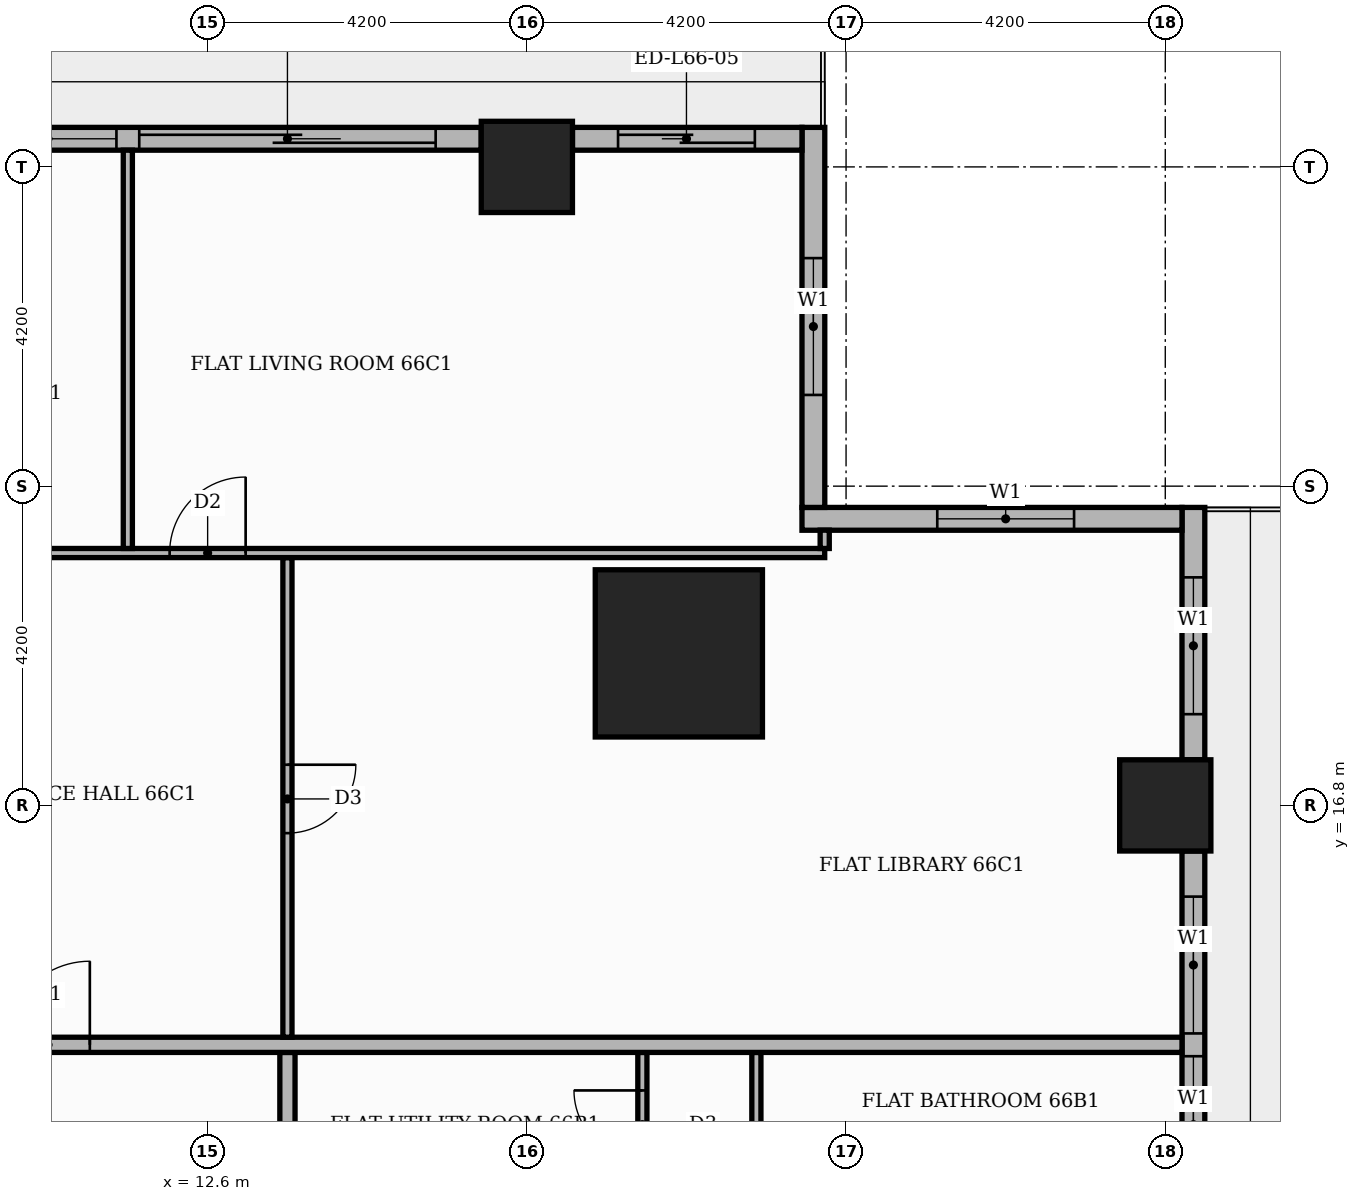
"""IFC4 building model, lengths in metres.
Left out: names, types, materials, properties, quantities, classifications, styles, units other than length and angle.
Written with IfcOpenShell. Run it as: python <this file> out.ifc"""

import sys

from ifc_helpers import new_model, si_unit, direction, frame, frame_2d, origin, origin_2d, place, context, subcontext, project, spatial, rectangle, extrude, element, fill, save


model = new_model("IFC4")
c1 = context("Model", 3, precision=1e-05, world=origin(), true_north=direction((0.0, 1.0)))
c2 = subcontext(c1, "Body", "Model", "MODEL_VIEW")
j1 = project(units=[si_unit("LENGTHUNIT", "METRE"), si_unit("PLANEANGLEUNIT", "RADIAN")], contexts=[c1])
p1 = place(None, origin())
s1 = spatial("IfcSite", under=j1, at=p1, CompositionType="ELEMENT")
p2 = place(p1, origin())
s2 = spatial("IfcBuilding", under=s1, at=p2, CompositionType="ELEMENT")
p3 = place(p2, frame((0.0, 0.0, 275.7)))
s3 = spatial("IfcBuildingStorey", under=s2, at=p3, CompositionType="ELEMENT", Elevation=275.7)
p4 = place(p3, frame((18.8, 18.8, 0.0), z_axis=(0.0, 0.0, 1.0), x_axis=(1.0, 0.0, 0.0)))
e1 = element("IfcColumn", 1, at=p4, inside=s3, PredefinedType="COLUMN", context=c2, shape_type="SweptSolid", body=[
    extrude(rectangle(XDim=2.2, YDim=2.2, at=origin_2d()), origin(), (0.0, 0.0, 1.0), 3.9),
])
for number, where, z_axis, x_axis in (
    (2, (25.2, 16.8, 0.0), (0.0, 0.0, 1.0), (1.0, 0.0, 0.0)),
    (3, (16.8, 25.2, 0.0), (0.0, 0.0, 1.0), (1.0, 0.0, 0.0)),
):
    element("IfcColumn", number, at=place(p3, frame(where, z_axis=z_axis, x_axis=x_axis)), inside=s3, PredefinedType="COLUMN", context=c2, shape_type="SweptSolid", body=[
        extrude(rectangle(XDim=1.2, YDim=1.2, at=origin_2d()), origin(), (0.0, 0.0, 1.0), 3.9),
    ])
p5 = place(p3, frame((25.57, 9.0, 0.0), z_axis=(0.0, 0.0, 1.0), x_axis=(0.0, 1.0, 0.0)))
e4 = element("IfcWall", 4, at=p5, inside=s3, PredefinedType="STANDARD", context=c2, shape_type="SweptSolid", body=[
    extrude(rectangle(XDim=7.2, YDim=0.3, at=frame_2d((3.6, 0.0))), origin(), (0.0, 0.0, 1.0), 3.48),
])
p6 = place(p5, frame((0.6, 0.0, 0.9)))
e5 = element("IfcOpeningElement", 5, at=p6, cuts=e4, PredefinedType="OPENING", context=c2, shape_type="SweptSolid", body=[
    extrude(rectangle(XDim=1.8, YDim=2.1, at=frame_2d((0.9, 1.05))), frame((0.0, 0.16, 0.0), z_axis=(0.0, -1.0, 0.0), x_axis=(1.0, 0.0, 0.0)), (0.0, 0.0, 1.0), 0.32),
])
p7 = place(p5, frame((2.7, 0.0, 0.9)))
e6 = element("IfcOpeningElement", 6, at=p7, cuts=e4, PredefinedType="OPENING", context=c2, shape_type="SweptSolid", body=[
    extrude(rectangle(XDim=1.8, YDim=2.1, at=frame_2d((0.9, 1.05))), frame((0.0, 0.16, 0.0), z_axis=(0.0, -1.0, 0.0), x_axis=(1.0, 0.0, 0.0)), (0.0, 0.0, 1.0), 0.32),
])
p8 = place(p5, frame((4.8, 0.0, 0.9)))
e7 = element("IfcOpeningElement", 7, at=p8, cuts=e4, PredefinedType="OPENING", context=c2, shape_type="SweptSolid", body=[
    extrude(rectangle(XDim=1.8, YDim=2.1, at=frame_2d((0.9, 1.05))), frame((0.0, 0.16, 0.0), z_axis=(0.0, -1.0, 0.0), x_axis=(1.0, 0.0, 0.0)), (0.0, 0.0, 1.0), 0.32),
])
p9 = place(p3, frame((25.57, 17.4, 0.0), z_axis=(0.0, 0.0, 1.0), x_axis=(0.0, 1.0, 0.0)))
e8 = element("IfcWall", 8, at=p9, inside=s3, PredefinedType="STANDARD", context=c2, shape_type="SweptSolid", body=[
    extrude(rectangle(XDim=3.32, YDim=0.3, at=frame_2d((1.66, 0.0))), origin(), (0.0, 0.0, 1.0), 3.48),
])
p10 = place(p9, frame((0.6, 0.0, 0.9)))
e9 = element("IfcOpeningElement", 9, at=p10, cuts=e8, PredefinedType="OPENING", context=c2, shape_type="SweptSolid", body=[
    extrude(rectangle(XDim=1.8, YDim=2.1, at=frame_2d((0.9, 1.05))), frame((0.0, 0.16, 0.0), z_axis=(0.0, -1.0, 0.0), x_axis=(1.0, 0.0, 0.0)), (0.0, 0.0, 1.0), 0.32),
])
p11 = place(p3, frame((25.42, 20.57, 0.0), z_axis=(0.0, 0.0, 1.0), x_axis=(-1.0, 0.0, 0.0)))
e10 = element("IfcWall", 10, at=p11, inside=s3, PredefinedType="STANDARD", context=c2, shape_type="SweptSolid", body=[
    extrude(rectangle(XDim=5.0, YDim=0.3, at=frame_2d((2.5, 0.0))), origin(), (0.0, 0.0, 1.0), 3.48),
])
p12 = place(p11, frame((1.42, 0.0, 0.9)))
e11 = element("IfcOpeningElement", 11, at=p12, cuts=e10, PredefinedType="OPENING", context=c2, shape_type="SweptSolid", body=[
    extrude(rectangle(XDim=1.8, YDim=2.1, at=frame_2d((0.9, 1.05))), frame((0.0, 0.16, 0.0), z_axis=(0.0, -1.0, 0.0), x_axis=(1.0, 0.0, 0.0)), (0.0, 0.0, 1.0), 0.32),
])
p13 = place(p3, frame((20.57, 20.72, 0.0), z_axis=(0.0, 0.0, 1.0), x_axis=(0.0, 1.0, 0.0)))
e12 = element("IfcWall", 12, at=p13, inside=s3, PredefinedType="STANDARD", context=c2, shape_type="SweptSolid", body=[
    extrude(rectangle(XDim=5.0, YDim=0.3, at=frame_2d((2.5, 0.0))), origin(), (0.0, 0.0, 1.0), 3.48),
])
p14 = place(p13, frame((1.48, 0.0, 0.9)))
e13 = element("IfcOpeningElement", 13, at=p14, cuts=e12, PredefinedType="OPENING", context=c2, shape_type="SweptSolid", body=[
    extrude(rectangle(XDim=1.8, YDim=2.1, at=frame_2d((0.9, 1.05))), frame((0.0, 0.16, 0.0), z_axis=(0.0, -1.0, 0.0), x_axis=(1.0, 0.0, 0.0)), (0.0, 0.0, 1.0), 0.32),
])
p15 = place(p3, frame((20.42, 25.57, 0.0), z_axis=(0.0, 0.0, 1.0), x_axis=(-1.0, 0.0, 0.0)))
e14 = element("IfcWall", 14, at=p15, inside=s3, PredefinedType="STANDARD", context=c2, shape_type="SweptSolid", body=[
    extrude(rectangle(XDim=3.02, YDim=0.3, at=frame_2d((1.51, 0.0))), origin(), (0.0, 0.0, 1.0), 3.48),
])
p16 = place(p15, frame((0.62, 0.0, 0.0)))
e15 = element("IfcOpeningElement", 15, at=p16, cuts=e14, PredefinedType="OPENING", context=c2, shape_type="SweptSolid", body=[
    extrude(rectangle(XDim=1.8, YDim=2.4, at=frame_2d((0.9, 1.2))), frame((0.0, 0.16, 0.0), z_axis=(0.0, -1.0, 0.0), x_axis=(1.0, 0.0, 0.0)), (0.0, 0.0, 1.0), 0.32),
])
p17 = place(p3, frame((16.2, 25.57, 0.0), z_axis=(0.0, 0.0, 1.0), x_axis=(-1.0, 0.0, 0.0)))
e16 = element("IfcWall", 16, at=p17, inside=s3, PredefinedType="STANDARD", context=c2, shape_type="SweptSolid", body=[
    extrude(rectangle(XDim=7.2, YDim=0.3, at=frame_2d((3.6, 0.0))), origin(), (0.0, 0.0, 1.0), 3.48),
])
p18 = place(p17, frame((0.6, 0.0, 0.0)))
e17 = element("IfcOpeningElement", 17, at=p18, cuts=e16, PredefinedType="OPENING", context=c2, shape_type="SweptSolid", body=[
    extrude(rectangle(XDim=3.9, YDim=2.4, at=frame_2d((1.95, 1.2))), frame((0.0, 0.16, 0.0), z_axis=(0.0, -1.0, 0.0), x_axis=(1.0, 0.0, 0.0)), (0.0, 0.0, 1.0), 0.32),
])
p19 = place(p17, frame((4.8, 0.0, 0.9)))
e18 = element("IfcOpeningElement", 18, at=p19, cuts=e16, PredefinedType="OPENING", context=c2, shape_type="SweptSolid", body=[
    extrude(rectangle(XDim=1.8, YDim=2.1, at=frame_2d((0.9, 1.05))), frame((0.0, 0.16, 0.0), z_axis=(0.0, -1.0, 0.0), x_axis=(1.0, 0.0, 0.0)), (0.0, 0.0, 1.0), 0.32),
])
p20 = place(p3, frame((13.65, 11.1, 0.0), z_axis=(0.0, 0.0, 1.0), x_axis=(0.0, 1.0, 0.0)))
e19 = element("IfcWall", 19, at=p20, inside=s3, PredefinedType="PARTITIONING", context=c2, shape_type="SweptSolid", body=[
    extrude(rectangle(XDim=2.45, YDim=0.2, at=frame_2d((1.225, 0.0))), origin(), (0.0, 0.0, 1.0), 3.48),
])
p21 = place(p3, frame((18.32, 11.61, 0.0), z_axis=(0.0, 0.0, 1.0), x_axis=(0.0, 1.0, 0.0)))
e20 = element("IfcWall", 20, at=p21, inside=s3, PredefinedType="PARTITIONING", context=c2, shape_type="SweptSolid", body=[
    extrude(rectangle(XDim=1.94, YDim=0.12, at=frame_2d((0.97, 0.0))), origin(), (0.0, 0.0, 1.0), 3.48),
])
p22 = place(p21, frame((0.54, 0.0, 0.0)))
e21 = element("IfcOpeningElement", 21, at=p22, cuts=e20, PredefinedType="OPENING", context=c2, shape_type="SweptSolid", body=[
    extrude(rectangle(XDim=0.9, YDim=2.1, at=frame_2d((0.45, 1.05))), frame((0.0, 0.07, 0.0), z_axis=(0.0, -1.0, 0.0), x_axis=(1.0, 0.0, 0.0)), (0.0, 0.0, 1.0), 0.14),
])
p23 = place(p3, frame((19.82, 11.61, 0.0), z_axis=(0.0, 0.0, 1.0), x_axis=(0.0, 1.0, 0.0)))
e22 = element("IfcWall", 22, at=p23, inside=s3, PredefinedType="PARTITIONING", context=c2, shape_type="SweptSolid", body=[
    extrude(rectangle(XDim=1.94, YDim=0.12, at=frame_2d((0.97, 0.0))), origin(), (0.0, 0.0, 1.0), 3.48),
])
p24 = place(p3, frame((-13.65, 13.65, 0.0), z_axis=(0.0, 0.0, 1.0), x_axis=(1.0, 0.0, 0.0)))
e23 = element("IfcWall", 23, at=p24, inside=s3, PredefinedType="PARTITIONING", context=c2, shape_type="SweptSolid", body=[
    extrude(rectangle(XDim=39.07, YDim=0.2, at=frame_2d((19.535, 0.0))), origin(), (0.0, 0.0, 1.0), 3.48),
])
p25 = place(p24, frame((23.6, 0.0, 0.0)))
e24 = element("IfcOpeningElement", 24, at=p25, cuts=e23, PredefinedType="OPENING", context=c2, shape_type="SweptSolid", body=[
    extrude(rectangle(XDim=1.1, YDim=2.4, at=frame_2d((0.55, 1.2))), frame((0.0, 0.11, 0.0), z_axis=(0.0, -1.0, 0.0), x_axis=(1.0, 0.0, 0.0)), (0.0, 0.0, 1.0), 0.22),
])
p26 = place(p3, frame((13.65, 13.75, 0.0), z_axis=(0.0, 0.0, 1.0), x_axis=(0.0, 1.0, 0.0)))
e25 = element("IfcWall", 25, at=p26, inside=s3, PredefinedType="PARTITIONING", context=c2, shape_type="SweptSolid", body=[
    extrude(rectangle(XDim=6.31, YDim=0.12, at=frame_2d((3.155, 0.0))), origin(), (0.0, 0.0, 1.0), 3.48),
])
p27 = place(p26, frame((2.685, 0.0, 0.0)))
e26 = element("IfcOpeningElement", 26, at=p27, cuts=e25, PredefinedType="OPENING", context=c2, shape_type="SweptSolid", body=[
    extrude(rectangle(XDim=0.9, YDim=2.1, at=frame_2d((0.45, 1.05))), frame((0.0, 0.07, 0.0), z_axis=(0.0, -1.0, 0.0), x_axis=(1.0, 0.0, 0.0)), (0.0, 0.0, 1.0), 0.14),
])
p28 = place(p3, frame((-13.55, 20.12, 0.0), z_axis=(0.0, 0.0, 1.0), x_axis=(1.0, 0.0, 0.0)))
e27 = element("IfcWall", 27, at=p28, inside=s3, PredefinedType="PARTITIONING", context=c2, shape_type="SweptSolid", body=[
    extrude(rectangle(XDim=34.269, YDim=0.12, at=frame_2d((17.135, 0.0))), origin(), (0.0, 0.0, 1.0), 3.48),
])
p29 = place(p28, frame((25.65, 0.0, 0.0)))
e28 = element("IfcOpeningElement", 28, at=p29, cuts=e27, PredefinedType="OPENING", context=c2, shape_type="SweptSolid", body=[
    extrude(rectangle(XDim=1.0, YDim=2.1, at=frame_2d((0.5, 1.05))), frame((0.0, 0.07, 0.0), z_axis=(0.0, -1.0, 0.0), x_axis=(1.0, 0.0, 0.0)), (0.0, 0.0, 1.0), 0.14),
])
p30 = place(p28, frame((22.55, 0.0, 0.0)))
e29 = element("IfcOpeningElement", 29, at=p30, cuts=e27, PredefinedType="OPENING", context=c2, shape_type="SweptSolid", body=[
    extrude(rectangle(XDim=0.9, YDim=2.1, at=frame_2d((0.45, 1.05))), frame((0.0, 0.07, 0.0), z_axis=(0.0, -1.0, 0.0), x_axis=(1.0, 0.0, 0.0)), (0.0, 0.0, 1.0), 0.14),
])
p31 = place(p28, frame((18.35, 0.0, 0.0)))
e30 = element("IfcOpeningElement", 30, at=p31, cuts=e27, PredefinedType="OPENING", context=c2, shape_type="SweptSolid", body=[
    extrude(rectangle(XDim=0.9, YDim=2.1, at=frame_2d((0.45, 1.05))), frame((0.0, 0.07, 0.0), z_axis=(0.0, -1.0, 0.0), x_axis=(1.0, 0.0, 0.0)), (0.0, 0.0, 1.0), 0.14),
])
p32 = place(p28, frame((9.95, 0.0, 0.0)))
e31 = element("IfcOpeningElement", 31, at=p32, cuts=e27, PredefinedType="OPENING", context=c2, shape_type="SweptSolid", body=[
    extrude(rectangle(XDim=0.9, YDim=2.1, at=frame_2d((0.45, 1.05))), frame((0.0, 0.07, 0.0), z_axis=(0.0, -1.0, 0.0), x_axis=(1.0, 0.0, 0.0)), (0.0, 0.0, 1.0), 0.14),
])
p33 = place(p28, frame((3.65, 0.0, 0.0)))
e32 = element("IfcOpeningElement", 32, at=p33, cuts=e27, PredefinedType="OPENING", context=c2, shape_type="SweptSolid", body=[
    extrude(rectangle(XDim=0.9, YDim=2.1, at=frame_2d((0.45, 1.05))), frame((0.0, 0.07, 0.0), z_axis=(0.0, -1.0, 0.0), x_axis=(1.0, 0.0, 0.0)), (0.0, 0.0, 1.0), 0.14),
])
p34 = place(p3, frame((11.55, 20.18, 0.0), z_axis=(0.0, 0.0, 1.0), x_axis=(0.0, 1.0, 0.0)))
e33 = element("IfcWall", 33, at=p34, inside=s3, PredefinedType="PARTITIONING", context=c2, shape_type="SweptSolid", body=[
    extrude(rectangle(XDim=5.24, YDim=0.12, at=frame_2d((2.62, 0.0))), origin(), (0.0, 0.0, 1.0), 3.48),
])
p35 = place(p3, frame((20.719, 20.18, 0.0), z_axis=(0.0, 0.0, 1.0), x_axis=(0.0, 1.0, 0.0)))
e34 = element("IfcWall", 34, at=p35, inside=s3, PredefinedType="PARTITIONING", context=c2, shape_type="SweptSolid", body=[
    extrude(rectangle(XDim=0.241, YDim=0.12, at=frame_2d((0.121, 0.0))), origin(), (0.0, 0.0, 1.0), 3.48),
])
p36 = place(p7, origin())
e35 = element("IfcWindow", 35, at=p36, inside=s3, PartitioningType="SINGLE_PANEL", PredefinedType="WINDOW", context=c2, shape_type="SweptSolid", body=[
    extrude(rectangle(XDim=1.8, YDim=2.1, at=frame_2d((0.9, 1.05))), frame((0.0, 0.03, 0.0), z_axis=(0.0, -1.0, 0.0), x_axis=(1.0, 0.0, 0.0)), (0.0, 0.0, 1.0), 0.06),
])
fill(e6, e35)
p37 = place(p8, origin())
e36 = element("IfcWindow", 36, at=p37, inside=s3, PartitioningType="SINGLE_PANEL", PredefinedType="WINDOW", context=c2, shape_type="SweptSolid", body=[
    extrude(rectangle(XDim=1.8, YDim=2.1, at=frame_2d((0.9, 1.05))), frame((0.0, 0.03, 0.0), z_axis=(0.0, -1.0, 0.0), x_axis=(1.0, 0.0, 0.0)), (0.0, 0.0, 1.0), 0.06),
])
fill(e7, e36)
p38 = place(p10, origin())
e37 = element("IfcWindow", 37, at=p38, inside=s3, PartitioningType="SINGLE_PANEL", PredefinedType="WINDOW", context=c2, shape_type="SweptSolid", body=[
    extrude(rectangle(XDim=1.8, YDim=2.1, at=frame_2d((0.9, 1.05))), frame((0.0, 0.03, 0.0), z_axis=(0.0, -1.0, 0.0), x_axis=(1.0, 0.0, 0.0)), (0.0, 0.0, 1.0), 0.06),
])
fill(e9, e37)
p39 = place(p12, origin())
e38 = element("IfcWindow", 38, at=p39, inside=s3, PartitioningType="SINGLE_PANEL", PredefinedType="WINDOW", context=c2, shape_type="SweptSolid", body=[
    extrude(rectangle(XDim=1.8, YDim=2.1, at=frame_2d((0.9, 1.05))), frame((0.0, 0.03, 0.0), z_axis=(0.0, -1.0, 0.0), x_axis=(1.0, 0.0, 0.0)), (0.0, 0.0, 1.0), 0.06),
])
fill(e11, e38)
p40 = place(p14, origin())
e39 = element("IfcWindow", 39, at=p40, inside=s3, PartitioningType="SINGLE_PANEL", PredefinedType="WINDOW", context=c2, shape_type="SweptSolid", body=[
    extrude(rectangle(XDim=1.8, YDim=2.1, at=frame_2d((0.9, 1.05))), frame((0.0, 0.03, 0.0), z_axis=(0.0, -1.0, 0.0), x_axis=(1.0, 0.0, 0.0)), (0.0, 0.0, 1.0), 0.06),
])
fill(e13, e39)
p41 = place(p16, origin())
e40 = element("IfcDoor", 40, at=p41, inside=s3, OperationType="SLIDING_TO_RIGHT", PredefinedType="DOOR", context=c2, shape_type="SweptSolid", body=[
    extrude(rectangle(XDim=1.8, YDim=2.4, at=frame_2d((0.9, 1.2))), frame((0.0, 0.025, 0.0), z_axis=(0.0, -1.0, 0.0), x_axis=(1.0, 0.0, 0.0)), (0.0, 0.0, 1.0), 0.05),
])
fill(e15, e40)
p42 = place(p18, origin())
e41 = element("IfcDoor", 41, at=p42, inside=s3, OperationType="SLIDING_TO_LEFT", PredefinedType="DOOR", context=c2, shape_type="SweptSolid", body=[
    extrude(rectangle(XDim=3.9, YDim=2.4, at=frame_2d((1.95, 1.2))), frame((0.0, 0.025, 0.0), z_axis=(0.0, -1.0, 0.0), x_axis=(1.0, 0.0, 0.0)), (0.0, 0.0, 1.0), 0.05),
])
fill(e17, e41)
p43 = place(p19, origin())
e42 = element("IfcWindow", 42, at=p43, inside=s3, PartitioningType="SINGLE_PANEL", PredefinedType="WINDOW", context=c2, shape_type="SweptSolid", body=[
    extrude(rectangle(XDim=1.8, YDim=2.1, at=frame_2d((0.9, 1.05))), frame((0.0, 0.03, 0.0), z_axis=(0.0, -1.0, 0.0), x_axis=(1.0, 0.0, 0.0)), (0.0, 0.0, 1.0), 0.06),
])
fill(e18, e42)
p44 = place(p22, origin())
e43 = element("IfcDoor", 43, at=p44, inside=s3, OperationType="SINGLE_SWING_RIGHT", PredefinedType="DOOR", context=c2, shape_type="SweptSolid", body=[
    extrude(rectangle(XDim=0.9, YDim=2.1, at=frame_2d((0.45, 1.05))), frame((0.0, 0.025, 0.0), z_axis=(0.0, -1.0, 0.0), x_axis=(1.0, 0.0, 0.0)), (0.0, 0.0, 1.0), 0.05),
])
fill(e21, e43)
p45 = place(p25, origin())
e44 = element("IfcDoor", 44, at=p45, inside=s3, OperationType="SINGLE_SWING_RIGHT", PredefinedType="DOOR", context=c2, shape_type="SweptSolid", body=[
    extrude(rectangle(XDim=1.1, YDim=2.4, at=frame_2d((0.55, 1.2))), frame((0.0, 0.025, 0.0), z_axis=(0.0, -1.0, 0.0), x_axis=(1.0, 0.0, 0.0)), (0.0, 0.0, 1.0), 0.05),
])
fill(e24, e44)
p46 = place(p27, frame((0.9, 0.0, 0.0), z_axis=(0.0, 0.0, 1.0), x_axis=(-1.0, 0.0, 0.0)))
e45 = element("IfcDoor", 45, at=p46, inside=s3, OperationType="SINGLE_SWING_RIGHT", PredefinedType="DOOR", context=c2, shape_type="SweptSolid", body=[
    extrude(rectangle(XDim=0.9, YDim=2.1, at=frame_2d((0.45, 1.05))), frame((0.0, 0.025, 0.0), z_axis=(0.0, -1.0, 0.0), x_axis=(1.0, 0.0, 0.0)), (0.0, 0.0, 1.0), 0.05),
])
fill(e26, e45)
p47 = place(p29, origin())
e46 = element("IfcDoor", 46, at=p47, inside=s3, OperationType="SINGLE_SWING_RIGHT", PredefinedType="DOOR", context=c2, shape_type="SweptSolid", body=[
    extrude(rectangle(XDim=1.0, YDim=2.1, at=frame_2d((0.5, 1.05))), frame((0.0, 0.025, 0.0), z_axis=(0.0, -1.0, 0.0), x_axis=(1.0, 0.0, 0.0)), (0.0, 0.0, 1.0), 0.05),
])
fill(e28, e46)
save(model, sys.argv[1])
